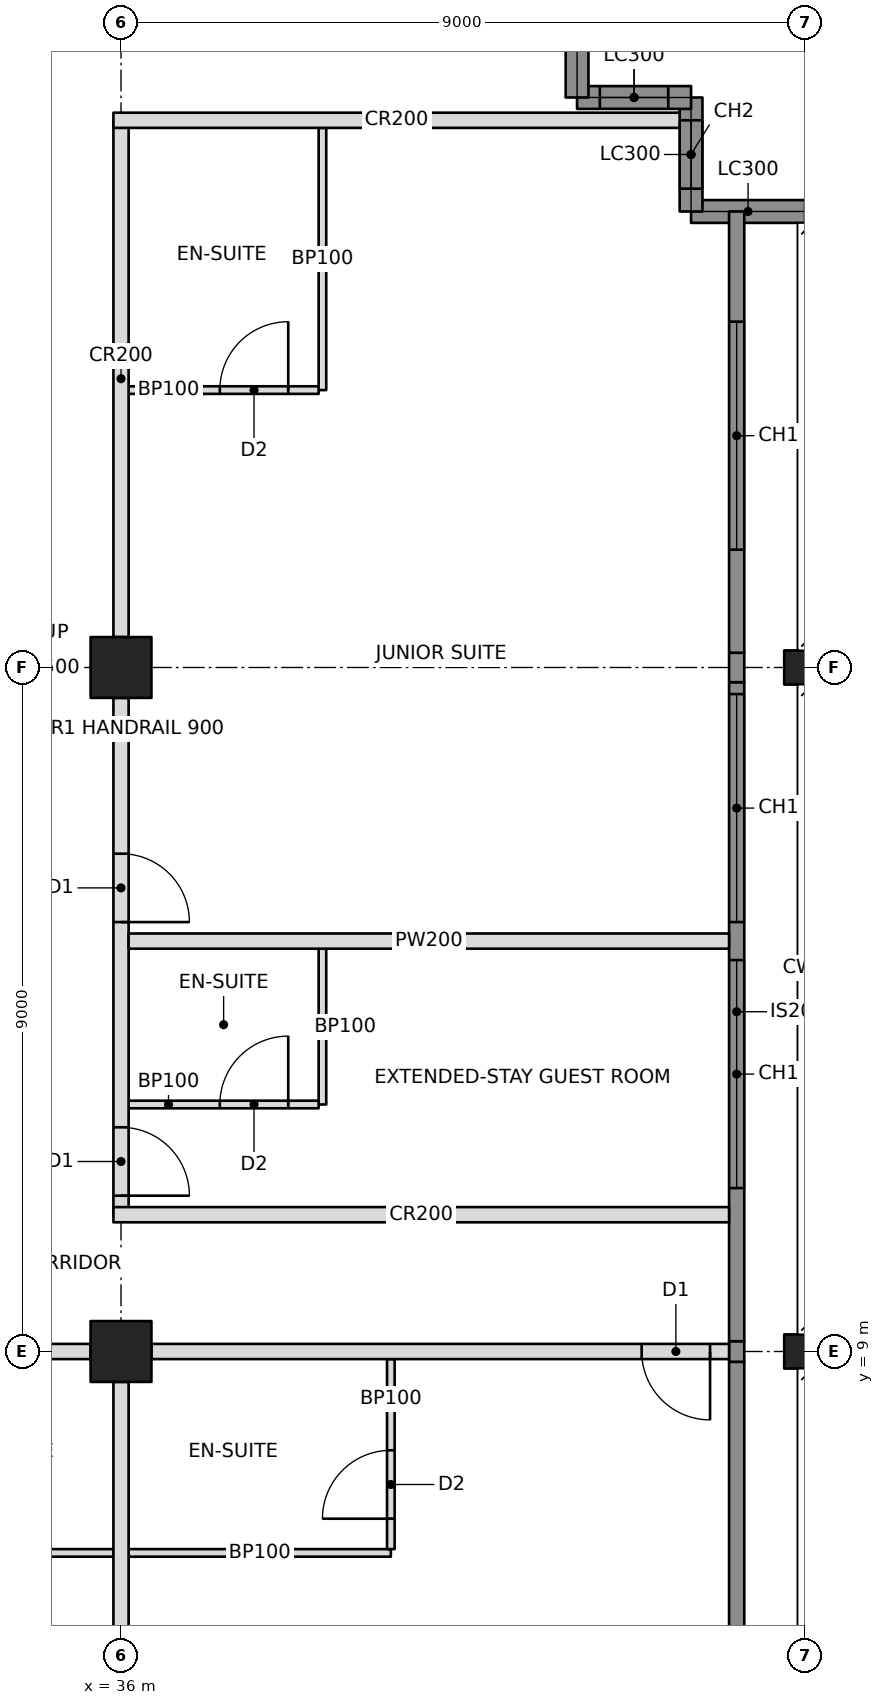
"""IFC4 building model, lengths in metres.
Left out: names, types, materials, properties, quantities, classifications, styles, units other than length and angle.
Written with IfcOpenShell. Run it as: python <this file> out.ifc"""

import sys

from ifc_helpers import new_model, si_unit, direction, frame, frame_2d, origin, origin_2d, place, context, subcontext, project, spatial, rectangle, hollow_rectangle, i_section, extrude, element, fill, save


model = new_model("IFC4")
c1 = context("Model", 3, precision=1e-05, world=origin(), true_north=direction((0.0, 1.0)))
c2 = subcontext(c1, "Body", "Model", "MODEL_VIEW")
j1 = project(units=[si_unit("LENGTHUNIT", "METRE"), si_unit("PLANEANGLEUNIT", "RADIAN")], contexts=[c1])
p1 = place(None, origin())
s1 = spatial("IfcSite", under=j1, at=p1, CompositionType="ELEMENT")
p2 = place(p1, origin())
s2 = spatial("IfcBuilding", under=s1, at=p2, CompositionType="ELEMENT")
p3 = place(p2, frame((0.0, 0.0, 174.0)))
s3 = spatial("IfcBuildingStorey", under=s2, at=p3, CompositionType="ELEMENT", Elevation=174.0)
for number, where, z_axis, x_axis in (
    (1, (36.0, 9.0, 0.0), (0.0, 0.0, 1.0), (0.0, 1.0, 0.0)),
    (2, (36.0, 18.0, 0.0), (0.0, 0.0, 1.0), (0.0, 1.0, 0.0)),
):
    element("IfcColumn", number, at=place(p3, frame(where, z_axis=z_axis, x_axis=x_axis)), inside=s3, PredefinedType="COLUMN", context=c2, shape_type="SweptSolid", body=[
        extrude(hollow_rectangle(XDim=0.8, YDim=0.8, WallThickness=0.06, at=origin_2d()), origin(), (0.0, 0.0, 1.0), 3.4),
    ])
for number, where, z_axis, x_axis in (
    (3, (45.0, 9.0, 0.0), (0.0, 0.0, 1.0), (0.0, 1.0, 0.0)),
    (4, (45.0, 18.0, 0.0), (0.0, 0.0, 1.0), (0.0, 1.0, 0.0)),
):
    element("IfcColumn", number, at=place(p3, frame(where, z_axis=z_axis, x_axis=x_axis)), inside=s3, PredefinedType="COLUMN", context=c2, shape_type="SweptSolid", body=[
        extrude(i_section(OverallWidth=0.449, OverallDepth=0.549, WebThickness=0.072, FlangeThickness=0.115, at=origin_2d()), origin(), (0.0, 0.0, 1.0), 3.4),
    ])
p4 = place(p3, frame((45.0, 24.0, 0.0), z_axis=(0.0, 0.0, 1.0), x_axis=(-1.0, 0.0, 0.0)))
e5 = element("IfcWall", 5, at=p4, inside=s3, PredefinedType="SOLIDWALL", context=c2, shape_type="SweptSolid", body=[
    extrude(rectangle(XDim=1.5, YDim=0.3, at=frame_2d((0.75, 0.0))), origin(), (0.0, 0.0, 1.0), 2.42),
])
p5 = place(p3, frame((43.5, 24.0, 0.0), z_axis=(0.0, 0.0, 1.0), x_axis=(0.0, 1.0, 0.0)))
e6 = element("IfcWall", 6, at=p5, inside=s3, PredefinedType="SOLIDWALL", context=c2, shape_type="SweptSolid", body=[
    extrude(rectangle(XDim=1.5, YDim=0.3, at=frame_2d((0.75, 0.0))), origin(), (0.0, 0.0, 1.0), 3.2),
])
p6 = place(p5, frame((0.3, 0.0, 0.6)))
e7 = element("IfcOpeningElement", 7, at=p6, cuts=e6, PredefinedType="OPENING", context=c2, shape_type="SweptSolid", body=[
    extrude(rectangle(XDim=0.9, YDim=2.2, at=frame_2d((0.45, 1.1))), frame((0.0, 0.16, 0.0), z_axis=(0.0, -1.0, 0.0), x_axis=(1.0, 0.0, 0.0)), (0.0, 0.0, 1.0), 0.32),
])
p7 = place(p3, frame((43.5, 25.5, 0.0), z_axis=(0.0, 0.0, 1.0), x_axis=(-1.0, 0.0, 0.0)))
e8 = element("IfcWall", 8, at=p7, inside=s3, PredefinedType="SOLIDWALL", context=c2, shape_type="SweptSolid", body=[
    extrude(rectangle(XDim=1.5, YDim=0.3, at=frame_2d((0.75, 0.0))), origin(), (0.0, 0.0, 1.0), 3.2),
])
p8 = place(p7, frame((0.3, 0.0, 0.6)))
e9 = element("IfcOpeningElement", 9, at=p8, cuts=e8, PredefinedType="OPENING", context=c2, shape_type="SweptSolid", body=[
    extrude(rectangle(XDim=0.9, YDim=2.2, at=frame_2d((0.45, 1.1))), frame((0.0, 0.16, 0.0), z_axis=(0.0, -1.0, 0.0), x_axis=(1.0, 0.0, 0.0)), (0.0, 0.0, 1.0), 0.32),
])
p9 = place(p3, frame((42.0, 25.5, 0.0), z_axis=(0.0, 0.0, 1.0), x_axis=(0.0, 1.0, 0.0)))
e10 = element("IfcWall", 10, at=p9, inside=s3, PredefinedType="SOLIDWALL", context=c2, shape_type="SweptSolid", body=[
    extrude(rectangle(XDim=1.5, YDim=0.3, at=frame_2d((0.75, 0.0))), origin(), (0.0, 0.0, 1.0), 2.42),
])
p10 = place(p3, frame((27.4, 9.0, 0.0), z_axis=(0.0, 0.0, 1.0), x_axis=(1.0, 0.0, 0.0)))
e11 = element("IfcWall", 11, at=p10, inside=s3, PredefinedType="PARTITIONING", context=c2, shape_type="SweptSolid", body=[
    extrude(rectangle(XDim=8.2, YDim=0.2, at=frame_2d((4.1, 0.0))), origin(), (0.0, 0.0, 1.0), 2.405),
])
p11 = place(p10, frame((0.15, 0.0, 0.0)))
e12 = element("IfcOpeningElement", 12, at=p11, cuts=e11, PredefinedType="OPENING", context=c2, shape_type="SweptSolid", body=[
    extrude(rectangle(XDim=0.9, YDim=2.1, at=frame_2d((0.45, 1.05))), frame((0.0, 0.11, 0.0), z_axis=(0.0, -1.0, 0.0), x_axis=(1.0, 0.0, 0.0)), (0.0, 0.0, 1.0), 0.22),
])
p12 = place(p3, frame((36.4, 9.0, 0.0), z_axis=(0.0, 0.0, 1.0), x_axis=(1.0, 0.0, 0.0)))
e13 = element("IfcWall", 13, at=p12, inside=s3, PredefinedType="PARTITIONING", context=c2, shape_type="SweptSolid", body=[
    extrude(rectangle(XDim=7.6, YDim=0.2, at=frame_2d((3.8, 0.0))), origin(), (0.0, 0.0, 1.0), 2.438),
])
p13 = place(p12, frame((6.45, 0.0, 0.0)))
e14 = element("IfcOpeningElement", 14, at=p13, cuts=e13, PredefinedType="OPENING", context=c2, shape_type="SweptSolid", body=[
    extrude(rectangle(XDim=0.9, YDim=2.1, at=frame_2d((0.45, 1.05))), frame((0.0, 0.11, 0.0), z_axis=(0.0, -1.0, 0.0), x_axis=(1.0, 0.0, 0.0)), (0.0, 0.0, 1.0), 0.22),
])
p14 = place(p3, frame((36.0, 10.8, 0.0), z_axis=(0.0, 0.0, 1.0), x_axis=(0.0, 1.0, 0.0)))
e15 = element("IfcWall", 15, at=p14, inside=s3, PredefinedType="PARTITIONING", context=c2, shape_type="SweptSolid", body=[
    extrude(rectangle(XDim=6.8, YDim=0.2, at=frame_2d((3.4, 0.0))), origin(), (0.0, 0.0, 1.0), 2.405),
])
p15 = place(p14, frame((0.25, 0.0, 0.0)))
e16 = element("IfcOpeningElement", 16, at=p15, cuts=e15, PredefinedType="OPENING", context=c2, shape_type="SweptSolid", body=[
    extrude(rectangle(XDim=0.9, YDim=2.1, at=frame_2d((0.45, 1.05))), frame((0.0, 0.11, 0.0), z_axis=(0.0, -1.0, 0.0), x_axis=(1.0, 0.0, 0.0)), (0.0, 0.0, 1.0), 0.22),
])
p16 = place(p14, frame((3.85, 0.0, 0.0)))
e17 = element("IfcOpeningElement", 17, at=p16, cuts=e15, PredefinedType="OPENING", context=c2, shape_type="SweptSolid", body=[
    extrude(rectangle(XDim=0.9, YDim=2.1, at=frame_2d((0.45, 1.05))), frame((0.0, 0.11, 0.0), z_axis=(0.0, -1.0, 0.0), x_axis=(1.0, 0.0, 0.0)), (0.0, 0.0, 1.0), 0.22),
])
p17 = place(p3, frame((36.0, 18.4, 0.0), z_axis=(0.0, 0.0, 1.0), x_axis=(0.0, 1.0, 0.0)))
e18 = element("IfcWall", 18, at=p17, inside=s3, PredefinedType="PARTITIONING", context=c2, shape_type="SweptSolid", body=[
    extrude(rectangle(XDim=6.8, YDim=0.2, at=frame_2d((3.4, 0.0))), origin(), (0.0, 0.0, 1.0), 2.405),
])
p18 = place(p3, frame((35.9, 10.8, 0.0), z_axis=(0.0, 0.0, 1.0), x_axis=(1.0, 0.0, 0.0)))
e19 = element("IfcWall", 19, at=p18, inside=s3, PredefinedType="PARTITIONING", context=c2, shape_type="SweptSolid", body=[
    extrude(rectangle(XDim=8.1, YDim=0.2, at=frame_2d((4.05, 0.0))), origin(), (0.0, 0.0, 1.0), 2.404),
])
p19 = place(p3, frame((35.9, 25.2, 0.0), z_axis=(0.0, 0.0, 1.0), x_axis=(1.0, 0.0, 0.0)))
e20 = element("IfcWall", 20, at=p19, inside=s3, PredefinedType="PARTITIONING", context=c2, shape_type="SweptSolid", body=[
    extrude(rectangle(XDim=7.45, YDim=0.2, at=frame_2d((3.725, 0.0))), origin(), (0.0, 0.0, 1.0), 2.404),
])
p20 = place(p3, frame((36.0, 8.6, 0.0), z_axis=(0.0, 0.0, 1.0), x_axis=(0.0, -1.0, 0.0)))
e21 = element("IfcWall", 21, at=p20, inside=s3, PredefinedType="PARTITIONING", context=c2, shape_type="SweptSolid", body=[
    extrude(rectangle(XDim=7.6, YDim=0.2, at=frame_2d((3.8, 0.0))), origin(), (0.0, 0.0, 1.0), 2.438),
])
for number, where, z_axis, x_axis in (
    (22, (32.45, 6.35, 0.0), (0.0, 0.0, 1.0), (1.0, 0.0, 0.0)),
    (23, (36.1, 6.35, 0.0), (0.0, 0.0, 1.0), (1.0, 0.0, 0.0)),
):
    element("IfcWall", number, at=place(p3, frame(where, z_axis=z_axis, x_axis=x_axis)), inside=s3, PredefinedType="PARTITIONING", context=c2, shape_type="SweptSolid", body=[
        extrude(rectangle(XDim=3.45, YDim=0.1, at=frame_2d((1.725, 0.0))), origin(), (0.0, 0.0, 1.0), 2.438),
    ])
p21 = place(p3, frame((39.55, 8.9, 0.0), z_axis=(0.0, 0.0, 1.0), x_axis=(0.0, -1.0, 0.0)))
e24 = element("IfcWall", 24, at=p21, inside=s3, PredefinedType="PARTITIONING", context=c2, shape_type="SweptSolid", body=[
    extrude(rectangle(XDim=2.5, YDim=0.1, at=frame_2d((1.25, 0.0))), origin(), (0.0, 0.0, 1.0), 2.438),
])
p22 = place(p21, frame((1.2, 0.0, 0.0)))
e25 = element("IfcOpeningElement", 25, at=p22, cuts=e24, PredefinedType="OPENING", context=c2, shape_type="SweptSolid", body=[
    extrude(rectangle(XDim=0.9, YDim=2.1, at=frame_2d((0.45, 1.05))), frame((0.0, 0.06, 0.0), z_axis=(0.0, -1.0, 0.0), x_axis=(1.0, 0.0, 0.0)), (0.0, 0.0, 1.0), 0.12),
])
p23 = place(p3, frame((36.1, 14.4, 0.0), z_axis=(0.0, 0.0, 1.0), x_axis=(1.0, 0.0, 0.0)))
e26 = element("IfcWall", 26, at=p23, inside=s3, PredefinedType="PARTITIONING", context=c2, shape_type="SweptSolid", body=[
    extrude(rectangle(XDim=7.9, YDim=0.2, at=frame_2d((3.95, 0.0))), origin(), (0.0, 0.0, 1.0), 2.404),
])
p24 = place(p3, frame((38.65, 12.25, 0.0), z_axis=(0.0, 0.0, 1.0), x_axis=(0.0, 1.0, 0.0)))
e27 = element("IfcWall", 27, at=p24, inside=s3, PredefinedType="PARTITIONING", context=c2, shape_type="SweptSolid", body=[
    extrude(rectangle(XDim=2.05, YDim=0.1, at=frame_2d((1.025, 0.0))), origin(), (0.0, 0.0, 1.0), 3.2),
])
p25 = place(p3, frame((36.1, 12.25, 0.0), z_axis=(0.0, 0.0, 1.0), x_axis=(1.0, 0.0, 0.0)))
e28 = element("IfcWall", 28, at=p25, inside=s3, PredefinedType="PARTITIONING", context=c2, shape_type="SweptSolid", body=[
    extrude(rectangle(XDim=2.5, YDim=0.1, at=frame_2d((1.25, 0.0))), origin(), (0.0, 0.0, 1.0), 2.404),
])
p26 = place(p25, frame((1.2, 0.0, 0.0)))
e29 = element("IfcOpeningElement", 29, at=p26, cuts=e28, PredefinedType="OPENING", context=c2, shape_type="SweptSolid", body=[
    extrude(rectangle(XDim=0.9, YDim=2.1, at=frame_2d((0.45, 1.05))), frame((0.0, 0.06, 0.0), z_axis=(0.0, -1.0, 0.0), x_axis=(1.0, 0.0, 0.0)), (0.0, 0.0, 1.0), 0.12),
])
p27 = place(p3, frame((38.65, 21.65, 0.0), z_axis=(0.0, 0.0, 1.0), x_axis=(0.0, 1.0, 0.0)))
e30 = element("IfcWall", 30, at=p27, inside=s3, PredefinedType="PARTITIONING", context=c2, shape_type="SweptSolid", body=[
    extrude(rectangle(XDim=3.45, YDim=0.1, at=frame_2d((1.725, 0.0))), origin(), (0.0, 0.0, 1.0), 3.2),
])
p28 = place(p3, frame((36.1, 21.65, 0.0), z_axis=(0.0, 0.0, 1.0), x_axis=(1.0, 0.0, 0.0)))
e31 = element("IfcWall", 31, at=p28, inside=s3, PredefinedType="PARTITIONING", context=c2, shape_type="SweptSolid", body=[
    extrude(rectangle(XDim=2.5, YDim=0.1, at=frame_2d((1.25, 0.0))), origin(), (0.0, 0.0, 1.0), 2.404),
])
p29 = place(p28, frame((1.2, 0.0, 0.0)))
e32 = element("IfcOpeningElement", 32, at=p29, cuts=e31, PredefinedType="OPENING", context=c2, shape_type="SweptSolid", body=[
    extrude(rectangle(XDim=0.9, YDim=2.1, at=frame_2d((0.45, 1.05))), frame((0.0, 0.06, 0.0), z_axis=(0.0, -1.0, 0.0), x_axis=(1.0, 0.0, 0.0)), (0.0, 0.0, 1.0), 0.12),
])
p30 = place(p3, frame((44.1, 4.607, 0.0), z_axis=(0.0, 0.0, 1.0), x_axis=(0.0, 1.0, 0.0)))
e33 = element("IfcWall", 33, at=p30, inside=s3, PredefinedType="SOLIDWALL", context=c2, shape_type="SweptSolid", body=[
    extrude(rectangle(XDim=4.257, YDim=0.2, at=frame_2d((2.129, 0.0))), origin(), (0.0, 0.0, 1.0), 3.2),
])
p31 = place(p3, frame((44.1, 8.865, 0.0), z_axis=(0.0, 0.0, 1.0), x_axis=(0.0, 1.0, 0.0)))
e34 = element("IfcWall", 34, at=p31, inside=s3, PredefinedType="SOLIDWALL", context=c2, shape_type="SweptSolid", body=[
    extrude(rectangle(XDim=0.271, YDim=0.2, at=frame_2d((0.135, 0.0))), origin(), (0.0, 0.0, 1.0), 2.438),
])
p32 = place(p3, frame((44.1, 9.135, 0.0), z_axis=(0.0, 0.0, 1.0), x_axis=(0.0, 1.0, 0.0)))
e35 = element("IfcWall", 35, at=p32, inside=s3, PredefinedType="SOLIDWALL", context=c2, shape_type="SweptSolid", body=[
    extrude(rectangle(XDim=8.671, YDim=0.2, at=frame_2d((4.335, 0.0))), origin(), (0.0, 0.0, 1.0), 3.2),
])
p33 = place(p32, frame((2.015, 0.0, 0.6)))
e36 = element("IfcOpeningElement", 36, at=p33, cuts=e35, PredefinedType="OPENING", context=c2, shape_type="SweptSolid", body=[
    extrude(rectangle(XDim=3.0, YDim=2.2, at=frame_2d((1.5, 1.1))), frame((0.0, 0.11, 0.0), z_axis=(0.0, -1.0, 0.0), x_axis=(1.0, 0.0, 0.0)), (0.0, 0.0, 1.0), 0.22),
])
p34 = place(p32, frame((5.515, 0.0, 0.6)))
e37 = element("IfcOpeningElement", 37, at=p34, cuts=e35, PredefinedType="OPENING", context=c2, shape_type="SweptSolid", body=[
    extrude(rectangle(XDim=3.0, YDim=2.2, at=frame_2d((1.5, 1.1))), frame((0.0, 0.11, 0.0), z_axis=(0.0, -1.0, 0.0), x_axis=(1.0, 0.0, 0.0)), (0.0, 0.0, 1.0), 0.22),
])
p35 = place(p3, frame((44.1, 17.806, 0.0), z_axis=(0.0, 0.0, 1.0), x_axis=(0.0, 1.0, 0.0)))
e38 = element("IfcWall", 38, at=p35, inside=s3, PredefinedType="SOLIDWALL", context=c2, shape_type="SweptSolid", body=[
    extrude(rectangle(XDim=0.388, YDim=0.2, at=frame_2d((0.194, 0.0))), origin(), (0.0, 0.0, 1.0), 2.404),
])
p36 = place(p3, frame((44.1, 18.194, 0.0), z_axis=(0.0, 0.0, 1.0), x_axis=(0.0, 1.0, 0.0)))
e39 = element("IfcWall", 39, at=p36, inside=s3, PredefinedType="SOLIDWALL", context=c2, shape_type="SweptSolid", body=[
    extrude(rectangle(XDim=5.806, YDim=0.2, at=frame_2d((2.903, 0.0))), origin(), (0.0, 0.0, 1.0), 3.2),
])
p37 = place(p36, frame((1.356, 0.0, 0.6)))
e40 = element("IfcOpeningElement", 40, at=p37, cuts=e39, PredefinedType="OPENING", context=c2, shape_type="SweptSolid", body=[
    extrude(rectangle(XDim=3.0, YDim=2.2, at=frame_2d((1.5, 1.1))), frame((0.0, 0.11, 0.0), z_axis=(0.0, -1.0, 0.0), x_axis=(1.0, 0.0, 0.0)), (0.0, 0.0, 1.0), 0.22),
])
p38 = place(p6, origin())
e41 = element("IfcWindow", 41, at=p38, inside=s3, PartitioningType="SINGLE_PANEL", PredefinedType="WINDOW", context=c2, shape_type="SweptSolid", body=[
    extrude(rectangle(XDim=0.9, YDim=2.2, at=frame_2d((0.45, 1.1))), frame((0.0, 0.03, 0.0), z_axis=(0.0, -1.0, 0.0), x_axis=(1.0, 0.0, 0.0)), (0.0, 0.0, 1.0), 0.06),
])
fill(e7, e41)
p39 = place(p8, origin())
e42 = element("IfcWindow", 42, at=p39, inside=s3, PartitioningType="SINGLE_PANEL", PredefinedType="WINDOW", context=c2, shape_type="SweptSolid", body=[
    extrude(rectangle(XDim=0.9, YDim=2.2, at=frame_2d((0.45, 1.1))), frame((0.0, 0.03, 0.0), z_axis=(0.0, -1.0, 0.0), x_axis=(1.0, 0.0, 0.0)), (0.0, 0.0, 1.0), 0.06),
])
fill(e9, e42)
p40 = place(p33, origin())
e43 = element("IfcWindow", 43, at=p40, inside=s3, PartitioningType="TRIPLE_PANEL_VERTICAL", PredefinedType="WINDOW", context=c2, shape_type="SweptSolid", body=[
    extrude(rectangle(XDim=3.0, YDim=2.2, at=frame_2d((1.5, 1.1))), frame((0.0, 0.03, 0.0), z_axis=(0.0, -1.0, 0.0), x_axis=(1.0, 0.0, 0.0)), (0.0, 0.0, 1.0), 0.06),
])
fill(e36, e43)
p41 = place(p34, origin())
e44 = element("IfcWindow", 44, at=p41, inside=s3, PartitioningType="TRIPLE_PANEL_VERTICAL", PredefinedType="WINDOW", context=c2, shape_type="SweptSolid", body=[
    extrude(rectangle(XDim=3.0, YDim=2.2, at=frame_2d((1.5, 1.1))), frame((0.0, 0.03, 0.0), z_axis=(0.0, -1.0, 0.0), x_axis=(1.0, 0.0, 0.0)), (0.0, 0.0, 1.0), 0.06),
])
fill(e37, e44)
p42 = place(p37, origin())
e45 = element("IfcWindow", 45, at=p42, inside=s3, PartitioningType="TRIPLE_PANEL_VERTICAL", PredefinedType="WINDOW", context=c2, shape_type="SweptSolid", body=[
    extrude(rectangle(XDim=3.0, YDim=2.2, at=frame_2d((1.5, 1.1))), frame((0.0, 0.03, 0.0), z_axis=(0.0, -1.0, 0.0), x_axis=(1.0, 0.0, 0.0)), (0.0, 0.0, 1.0), 0.06),
])
fill(e40, e45)
p43 = place(p22, frame((0.9, 0.0, 0.0), z_axis=(0.0, 0.0, 1.0), x_axis=(-1.0, 0.0, 0.0)))
e46 = element("IfcDoor", 46, at=p43, inside=s3, OperationType="SINGLE_SWING_LEFT", PredefinedType="DOOR", context=c2, shape_type="SweptSolid", body=[
    extrude(rectangle(XDim=0.9, YDim=2.1, at=frame_2d((0.45, 1.05))), frame((0.0, 0.025, 0.0), z_axis=(0.0, -1.0, 0.0), x_axis=(1.0, 0.0, 0.0)), (0.0, 0.0, 1.0), 0.05),
])
fill(e25, e46)
p44 = place(p13, frame((0.9, 0.0, 0.0), z_axis=(0.0, 0.0, 1.0), x_axis=(-1.0, 0.0, 0.0)))
e47 = element("IfcDoor", 47, at=p44, inside=s3, OperationType="SINGLE_SWING_LEFT", PredefinedType="DOOR", context=c2, shape_type="SweptSolid", body=[
    extrude(rectangle(XDim=0.9, YDim=2.1, at=frame_2d((0.45, 1.05))), frame((0.0, 0.025, 0.0), z_axis=(0.0, -1.0, 0.0), x_axis=(1.0, 0.0, 0.0)), (0.0, 0.0, 1.0), 0.05),
])
fill(e14, e47)
p45 = place(p26, origin())
e48 = element("IfcDoor", 48, at=p45, inside=s3, OperationType="SINGLE_SWING_RIGHT", PredefinedType="DOOR", context=c2, shape_type="SweptSolid", body=[
    extrude(rectangle(XDim=0.9, YDim=2.1, at=frame_2d((0.45, 1.05))), frame((0.0, 0.025, 0.0), z_axis=(0.0, -1.0, 0.0), x_axis=(1.0, 0.0, 0.0)), (0.0, 0.0, 1.0), 0.05),
])
fill(e29, e48)
p46 = place(p15, frame((0.9, 0.0, 0.0), z_axis=(0.0, 0.0, 1.0), x_axis=(-1.0, 0.0, 0.0)))
e49 = element("IfcDoor", 49, at=p46, inside=s3, OperationType="SINGLE_SWING_RIGHT", PredefinedType="DOOR", context=c2, shape_type="SweptSolid", body=[
    extrude(rectangle(XDim=0.9, YDim=2.1, at=frame_2d((0.45, 1.05))), frame((0.0, 0.025, 0.0), z_axis=(0.0, -1.0, 0.0), x_axis=(1.0, 0.0, 0.0)), (0.0, 0.0, 1.0), 0.05),
])
fill(e16, e49)
p47 = place(p29, origin())
e50 = element("IfcDoor", 50, at=p47, inside=s3, OperationType="SINGLE_SWING_RIGHT", PredefinedType="DOOR", context=c2, shape_type="SweptSolid", body=[
    extrude(rectangle(XDim=0.9, YDim=2.1, at=frame_2d((0.45, 1.05))), frame((0.0, 0.025, 0.0), z_axis=(0.0, -1.0, 0.0), x_axis=(1.0, 0.0, 0.0)), (0.0, 0.0, 1.0), 0.05),
])
fill(e32, e50)
p48 = place(p16, frame((0.9, 0.0, 0.0), z_axis=(0.0, 0.0, 1.0), x_axis=(-1.0, 0.0, 0.0)))
e51 = element("IfcDoor", 51, at=p48, inside=s3, OperationType="SINGLE_SWING_RIGHT", PredefinedType="DOOR", context=c2, shape_type="SweptSolid", body=[
    extrude(rectangle(XDim=0.9, YDim=2.1, at=frame_2d((0.45, 1.05))), frame((0.0, 0.025, 0.0), z_axis=(0.0, -1.0, 0.0), x_axis=(1.0, 0.0, 0.0)), (0.0, 0.0, 1.0), 0.05),
])
fill(e17, e51)
save(model, sys.argv[1])
